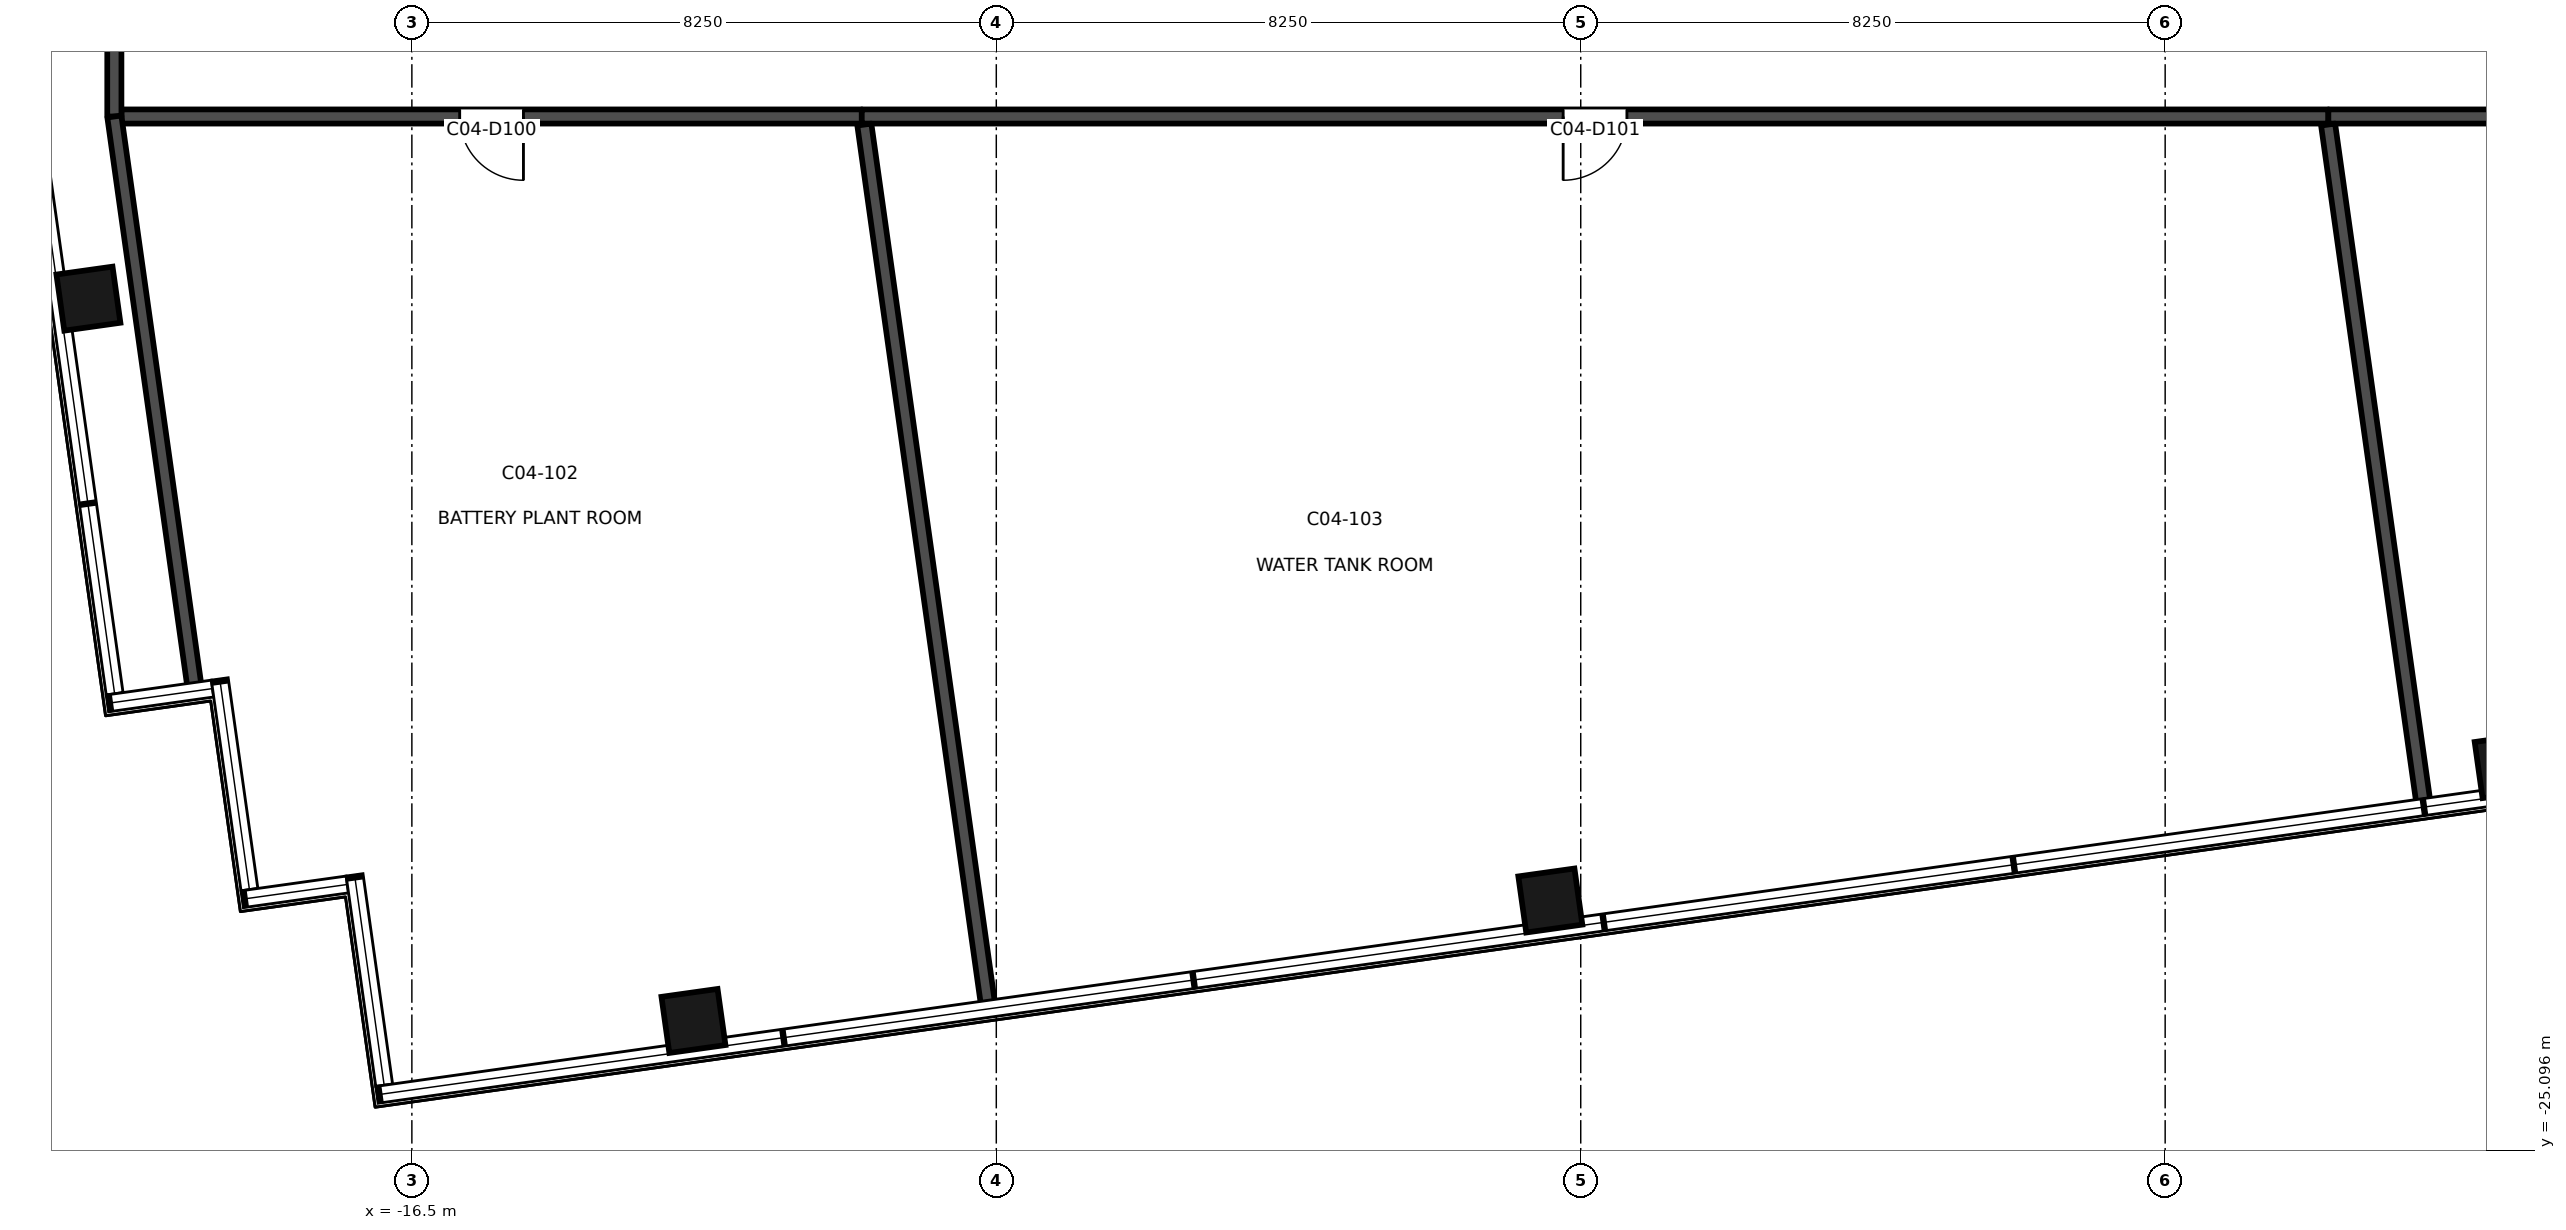
"""IFC4 building model, lengths in metres.
Left out: names, types, materials, properties, quantities, classifications, styles, units other than length and angle.
Written with IfcOpenShell. Run it as: python <this file> out.ifc"""

import sys

from ifc_helpers import new_model, si_unit, direction, frame, frame_2d, origin, origin_2d, place, context, subcontext, project, spatial, rectangle, extrude, element, fill, save


model = new_model("IFC4")
c1 = context("Model", 3, precision=1e-05, world=origin(), true_north=direction((0.0, 1.0)))
c2 = subcontext(c1, "Body", "Model", "MODEL_VIEW")
j1 = project(units=[si_unit("LENGTHUNIT", "METRE"), si_unit("PLANEANGLEUNIT", "RADIAN")], contexts=[c1])
p1 = place(None, origin())
s1 = spatial("IfcSite", under=j1, at=p1, CompositionType="ELEMENT")
p2 = place(p1, origin())
s2 = spatial("IfcBuilding", under=s1, at=p2, CompositionType="ELEMENT")
p3 = place(p2, frame((0.0, 0.0, 304.3)))
s3 = spatial("IfcBuildingStorey", under=s2, at=p3, CompositionType="ELEMENT", Elevation=304.3)
for number, where, z_axis, x_axis in (
    (1, (-12.525, -23.266, -0.2), (0.0, 0.0, 1.0), (0.99, 0.139, 0.0)),
    (2, (-0.429, -21.566, -0.2), (0.0, 0.0, 1.0), (0.99, 0.139, 0.0)),
    (3, (13.071, -19.669, -0.2), (0.0, 0.0, 1.0), (0.99, 0.139, 0.0)),
    (4, (-21.066, -13.071, -0.2), (0.0, 0.0, 1.0), (-0.139, 0.99, 0.0)),
):
    element("IfcColumn", number, at=place(p3, frame(where, z_axis=z_axis, x_axis=x_axis)), inside=s3, PredefinedType="COLUMN", context=c2, shape_type="SweptSolid", body=[
        extrude(rectangle(XDim=0.8, YDim=0.8, at=origin_2d()), origin(), (0.0, 0.0, 1.0), 4.0),
    ])
p4 = place(p3, frame((-10.149, -10.5, 0.0), z_axis=(0.0, 0.0, 1.0), x_axis=(-1.0, 0.0, 0.0)))
e5 = element("IfcWall", 5, at=p4, inside=s3, PredefinedType="PARTITIONING", context=c2, shape_type="SweptSolid", body=[
    extrude(rectangle(XDim=10.451, YDim=0.2, at=frame_2d((5.226, 0.0))), origin(), (0.0, 0.0, 1.0), 3.8),
])
p5 = place(p4, frame((4.776, 0.0, 0.0)))
e6 = element("IfcOpeningElement", 6, at=p5, cuts=e5, PredefinedType="OPENING", context=c2, shape_type="SweptSolid", body=[
    extrude(rectangle(XDim=0.9, YDim=2.1, at=frame_2d((0.45, 1.05))), frame((0.0, 0.111, 0.0), z_axis=(0.0, -1.0, 0.0), x_axis=(1.0, 0.0, 0.0)), (0.0, 0.0, 1.0), 0.221),
])
p6 = place(p3, frame((10.554, -10.5, 0.0), z_axis=(0.0, 0.0, 1.0), x_axis=(-1.0, 0.0, 0.0)))
e7 = element("IfcWall", 7, at=p6, inside=s3, PredefinedType="PARTITIONING", context=c2, shape_type="SweptSolid", body=[
    extrude(rectangle(XDim=20.703, YDim=0.2, at=frame_2d((10.352, 0.0))), origin(), (0.0, 0.0, 1.0), 3.1),
])
p7 = place(p6, frame((9.902, 0.0, 0.0)))
e8 = element("IfcOpeningElement", 8, at=p7, cuts=e7, PredefinedType="OPENING", context=c2, shape_type="SweptSolid", body=[
    extrude(rectangle(XDim=0.9, YDim=2.1, at=frame_2d((0.45, 1.05))), frame((0.0, 0.111, 0.0), z_axis=(0.0, -1.0, 0.0), x_axis=(1.0, 0.0, 0.0)), (0.0, 0.0, 1.0), 0.221),
])
p8 = place(p3, frame((20.7, -10.5, 0.0), z_axis=(0.0, 0.0, 1.0), x_axis=(-1.0, 0.0, 0.0)))
e9 = element("IfcWall", 9, at=p8, inside=s3, PredefinedType="PARTITIONING", context=c2, shape_type="SweptSolid", body=[
    extrude(rectangle(XDim=10.146, YDim=0.2, at=frame_2d((5.073, 0.0))), origin(), (0.0, 0.0, 1.0), 3.2),
])
p9 = place(p8, frame((4.623, 0.0, 0.0)))
e10 = element("IfcOpeningElement", 10, at=p9, cuts=e9, PredefinedType="OPENING", context=c2, shape_type="SweptSolid", body=[
    extrude(rectangle(XDim=0.9, YDim=2.1, at=frame_2d((0.45, 1.05))), frame((0.0, 0.111, 0.0), z_axis=(0.0, -1.0, 0.0), x_axis=(1.0, 0.0, 0.0)), (0.0, 0.0, 1.0), 0.221),
])
p10 = place(p3, frame((-20.7, -10.5, 0.0), z_axis=(0.0, 0.0, 1.0), x_axis=(0.0, 1.0, 0.0)))
e11 = element("IfcWall", 11, at=p10, inside=s3, PredefinedType="PARTITIONING", context=c2, shape_type="SweptSolid", body=[
    extrude(rectangle(XDim=18.0, YDim=0.2, at=frame_2d((9.0, 0.0))), origin(), (0.0, 0.0, 1.0), 3.5),
])
p11 = place(p10, frame((8.55, 0.0, 0.0)))
e12 = element("IfcOpeningElement", 12, at=p11, cuts=e11, PredefinedType="OPENING", context=c2, shape_type="SweptSolid", body=[
    extrude(rectangle(XDim=0.9, YDim=2.1, at=frame_2d((0.45, 1.05))), frame((0.0, 0.111, 0.0), z_axis=(0.0, -1.0, 0.0), x_axis=(1.0, 0.0, 0.0)), (0.0, 0.0, 1.0), 0.221),
])
p12 = place(p3, frame((-10.113, -10.614, 0.0), z_axis=(0.0, 0.0, 1.0), x_axis=(0.139213874613, -0.990262337522, 0.0)))
e13 = element("IfcWall", 13, at=p12, inside=s3, PredefinedType="PARTITIONING", context=c2, shape_type="SweptSolid", body=[
    extrude(rectangle(XDim=12.513, YDim=0.2, at=frame_2d((6.256, 0.0))), origin(), (0.0, 0.0, 1.0), 3.1),
])
p13 = place(p3, frame((-19.573, -18.52, 0.0), z_axis=(0.0, 0.0, 1.0), x_axis=(-0.13915044451, 0.990271252634, 0.0)))
e14 = element("IfcWall", 14, at=p13, inside=s3, PredefinedType="PARTITIONING", context=c2, shape_type="SweptSolid", body=[
    extrude(rectangle(XDim=8.099, YDim=0.2, at=frame_2d((4.049, 0.0))), origin(), (0.0, 0.0, 1.0), 3.8),
])
p14 = place(p3, frame((10.55, -10.614, 0.0), z_axis=(0.0, 0.0, 1.0), x_axis=(0.139161669219, -0.990269675301, 0.0)))
e15 = element("IfcWall", 15, at=p14, inside=s3, PredefinedType="PARTITIONING", context=c2, shape_type="SweptSolid", body=[
    extrude(rectangle(XDim=9.637, YDim=0.2, at=frame_2d((4.818, 0.0))), origin(), (0.0, 0.0, 1.0), 3.8),
])
p15 = place(p5, origin())
e16 = element("IfcDoor", 16, at=p15, inside=s3, OperationType="SINGLE_SWING_LEFT", PredefinedType="DOOR", context=c2, shape_type="SweptSolid", body=[
    extrude(rectangle(XDim=0.9, YDim=2.1, at=frame_2d((0.45, 1.05))), frame((0.0, 0.025, 0.0), z_axis=(0.0, -1.0, 0.0), x_axis=(1.0, 0.0, 0.0)), (0.0, 0.0, 1.0), 0.05),
])
fill(e6, e16)
p16 = place(p7, origin())
e17 = element("IfcDoor", 17, at=p16, inside=s3, OperationType="SINGLE_SWING_RIGHT", PredefinedType="DOOR", context=c2, shape_type="SweptSolid", body=[
    extrude(rectangle(XDim=0.9, YDim=2.1, at=frame_2d((0.45, 1.05))), frame((0.0, 0.025, 0.0), z_axis=(0.0, -1.0, 0.0), x_axis=(1.0, 0.0, 0.0)), (0.0, 0.0, 1.0), 0.05),
])
fill(e8, e17)
save(model, sys.argv[1])
